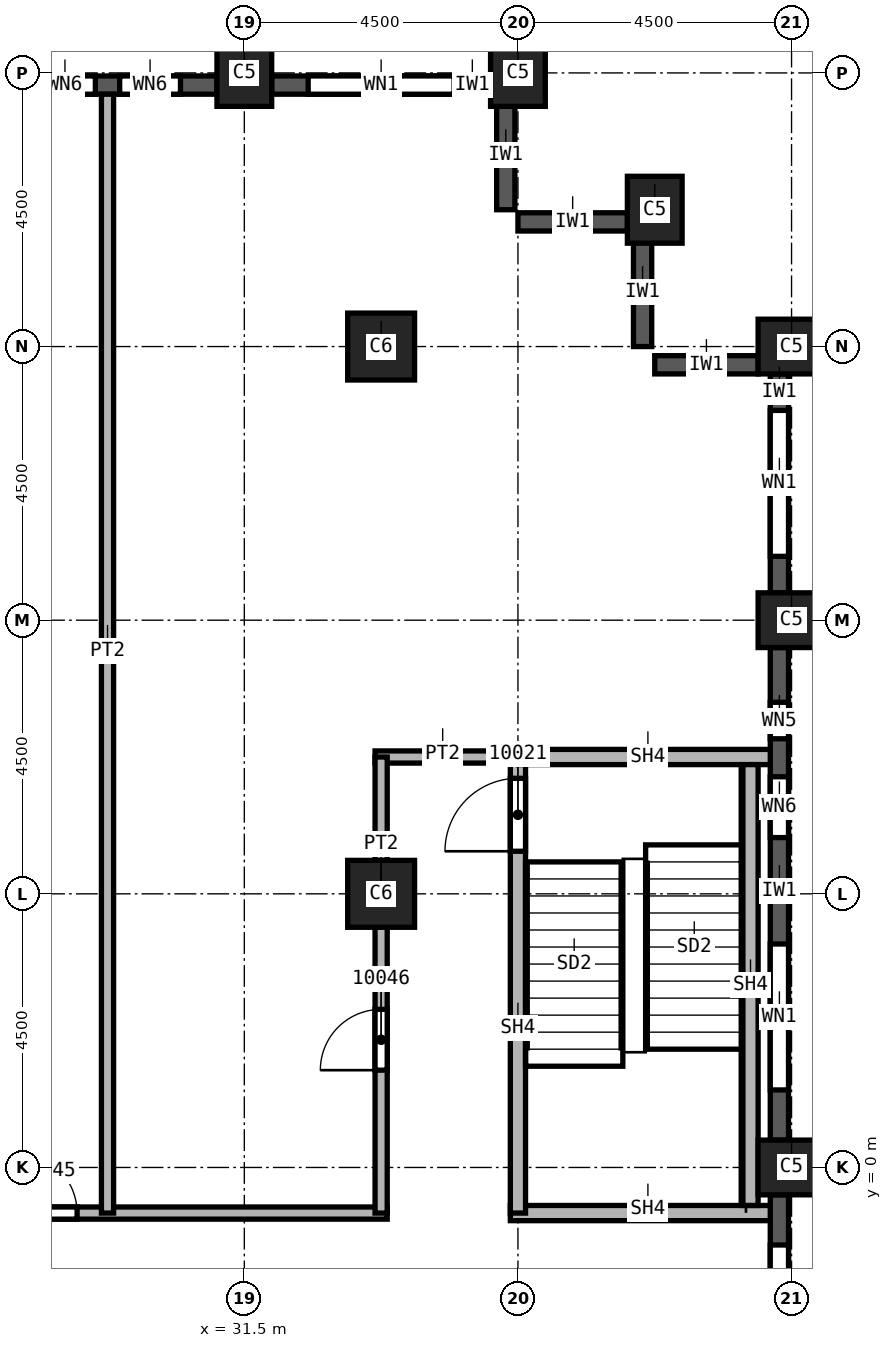
"""IFC4 building model, lengths in metres.
Left out: names, types, materials, properties, quantities, classifications, styles, units other than length and angle.
Written with IfcOpenShell. Run it as: python <this file> out.ifc"""

import sys

from ifc_helpers import new_model, si_unit, direction, frame, frame_2d, origin, origin_2d, place, context, subcontext, project, spatial, rectangle, extrude, element, fill, save


model = new_model("IFC4")
c1 = context("Model", 3, precision=1e-05, world=origin(), true_north=direction((0.0, 1.0)))
c2 = subcontext(c1, "Body", "Model", "MODEL_VIEW")
j1 = project(units=[si_unit("LENGTHUNIT", "METRE"), si_unit("PLANEANGLEUNIT", "RADIAN")], contexts=[c1])
p1 = place(None, origin())
s1 = spatial("IfcSite", under=j1, at=p1, CompositionType="ELEMENT")
p2 = place(p1, origin())
s2 = spatial("IfcBuilding", under=s1, at=p2, CompositionType="ELEMENT")
p3 = place(p2, frame((0.0, 0.0, 170.0)))
s3 = spatial("IfcBuildingStorey", under=s2, at=p3, CompositionType="ELEMENT", Elevation=170.0)
for number, where, z_axis, x_axis in (
    (1, (40.5, 0.0, 0.0), (0.0, 0.0, 1.0), (0.0, 1.0, 0.0)),
    (2, (40.5, 9.0, 0.0), (0.0, 0.0, 1.0), (0.0, 1.0, 0.0)),
    (3, (40.5, 13.5, 0.0), (0.0, 0.0, 1.0), (0.0, 1.0, 0.0)),
    (4, (38.25, 15.75, 0.0), (0.0, 0.0, 1.0), (1.0, 0.0, 0.0)),
    (5, (31.5, 18.0, 0.0), (0.0, 0.0, 1.0), (1.0, 0.0, 0.0)),
    (6, (36.0, 18.0, 0.0), (0.0, 0.0, 1.0), (1.0, 0.0, 0.0)),
):
    element("IfcColumn", number, at=place(p3, frame(where, z_axis=z_axis, x_axis=x_axis)), inside=s3, PredefinedType="COLUMN", context=c2, shape_type="SweptSolid", body=[
        extrude(rectangle(XDim=0.9, YDim=1.1, at=origin_2d()), origin(), (0.0, 0.0, 1.0), 3.7),
    ])
for number, where, z_axis, x_axis in (
    (7, (33.75, 4.5, 0.0), (0.0, 0.0, 1.0), (1.0, 0.0, 0.0)),
    (8, (33.75, 13.5, 0.0), (0.0, 0.0, 1.0), (1.0, 0.0, 0.0)),
):
    element("IfcColumn", number, at=place(p3, frame(where, z_axis=z_axis, x_axis=x_axis)), inside=s3, PredefinedType="COLUMN", context=c2, shape_type="SweptSolid", body=[
        extrude(rectangle(XDim=1.1, YDim=1.1, at=origin_2d()), origin(), (0.0, 0.0, 1.0), 3.7),
    ])
p4 = place(p3, frame((39.95, 13.2, 0.0), z_axis=(0.0, 0.0, 1.0), x_axis=(-1.0, 0.0, 0.0)))
e9 = element("IfcWall", 9, at=p4, inside=s3, PredefinedType="SOLIDWALL", context=c2, shape_type="SweptSolid", body=[
    extrude(rectangle(XDim=1.7, YDim=0.3, at=frame_2d((0.85, 0.0))), origin(), (0.0, 0.0, 1.0), 3.1),
])
for number, where, z_axis, x_axis in (
    (10, (38.05, 15.3, 0.0), (0.0, 0.0, 1.0), (0.0, -1.0, 0.0)),
    (11, (37.8, 15.55, 0.0), (0.0, 0.0, 1.0), (-1.0, 0.0, 0.0)),
    (12, (35.8, 17.55, 0.0), (0.0, 0.0, 1.0), (0.0, -1.0, 0.0)),
):
    element("IfcWall", number, at=place(p3, frame(where, z_axis=z_axis, x_axis=x_axis)), inside=s3, PredefinedType="SOLIDWALL", context=c2, shape_type="SweptSolid", body=[
        extrude(rectangle(XDim=1.8, YDim=0.3, at=frame_2d((0.9, 0.0))), origin(), (0.0, 0.0, 1.0), 3.1),
    ])
p5 = place(p3, frame((40.3, -8.55, 0.0), z_axis=(0.0, 0.0, 1.0), x_axis=(0.0, 1.0, 0.0)))
e13 = element("IfcWall", 13, at=p5, inside=s3, PredefinedType="SOLIDWALL", context=c2, shape_type="SweptSolid", body=[
    extrude(rectangle(XDim=8.1, YDim=0.3, at=frame_2d((4.05, 0.0))), origin(), (0.0, 0.0, 1.0), 3.1),
])
p6 = place(p5, frame((0.825, 0.0, 0.8)))
e14 = element("IfcOpeningElement", 14, at=p6, cuts=e13, PredefinedType="OPENING", context=c2, shape_type="SweptSolid", body=[
    extrude(rectangle(XDim=2.4, YDim=1.95, at=frame_2d((1.2, 0.975))), frame((0.0, 0.15, 0.0), z_axis=(0.0, -1.0, 0.0), x_axis=(1.0, 0.0, 0.0)), (0.0, 0.0, 1.0), 0.3),
])
p7 = place(p5, frame((4.875, 0.0, 0.8)))
e15 = element("IfcOpeningElement", 15, at=p7, cuts=e13, PredefinedType="OPENING", context=c2, shape_type="SweptSolid", body=[
    extrude(rectangle(XDim=2.4, YDim=1.95, at=frame_2d((1.2, 0.975))), frame((0.0, 0.15, 0.0), z_axis=(0.0, -1.0, 0.0), x_axis=(1.0, 0.0, 0.0)), (0.0, 0.0, 1.0), 0.3),
])
p8 = place(p3, frame((40.3, 0.45, 0.0), z_axis=(0.0, 0.0, 1.0), x_axis=(0.0, 1.0, 0.0)))
e16 = element("IfcWall", 16, at=p8, inside=s3, PredefinedType="SOLIDWALL", context=c2, shape_type="SweptSolid", body=[
    extrude(rectangle(XDim=8.1, YDim=0.3, at=frame_2d((4.05, 0.0))), origin(), (0.0, 0.0, 1.0), 3.1),
])
p9 = place(p8, frame((0.825, 0.0, 0.8)))
e17 = element("IfcOpeningElement", 17, at=p9, cuts=e16, PredefinedType="OPENING", context=c2, shape_type="SweptSolid", body=[
    extrude(rectangle(XDim=2.4, YDim=1.95, at=frame_2d((1.2, 0.975))), frame((0.0, 0.15, 0.0), z_axis=(0.0, -1.0, 0.0), x_axis=(1.0, 0.0, 0.0)), (0.0, 0.0, 1.0), 0.3),
])
p10 = place(p8, frame((4.975, 0.0, 0.8)))
e18 = element("IfcOpeningElement", 18, at=p10, cuts=e16, PredefinedType="OPENING", context=c2, shape_type="SweptSolid", body=[
    extrude(rectangle(XDim=1.0, YDim=1.95, at=frame_2d((0.5, 0.975))), frame((0.0, 0.15, 0.0), z_axis=(0.0, -1.0, 0.0), x_axis=(1.0, 0.0, 0.0)), (0.0, 0.0, 1.0), 0.3),
])
p11 = place(p8, frame((6.6, 0.0, 0.8)))
e19 = element("IfcOpeningElement", 19, at=p11, cuts=e16, PredefinedType="OPENING", context=c2, shape_type="SweptSolid", body=[
    extrude(rectangle(XDim=0.6, YDim=1.95, at=frame_2d((0.3, 0.975))), frame((0.0, 0.15, 0.0), z_axis=(0.0, -1.0, 0.0), x_axis=(1.0, 0.0, 0.0)), (0.0, 0.0, 1.0), 0.3),
])
p12 = place(p3, frame((40.3, 9.45, 0.0), z_axis=(0.0, 0.0, 1.0), x_axis=(0.0, 1.0, 0.0)))
e20 = element("IfcWall", 20, at=p12, inside=s3, PredefinedType="SOLIDWALL", context=c2, shape_type="SweptSolid", body=[
    extrude(rectangle(XDim=3.6, YDim=0.3, at=frame_2d((1.8, 0.0))), origin(), (0.0, 0.0, 1.0), 3.1),
])
p13 = place(p12, frame((0.6, 0.0, 0.8)))
e21 = element("IfcOpeningElement", 21, at=p13, cuts=e20, PredefinedType="OPENING", context=c2, shape_type="SweptSolid", body=[
    extrude(rectangle(XDim=2.4, YDim=1.95, at=frame_2d((1.2, 0.975))), frame((0.0, 0.15, 0.0), z_axis=(0.0, -1.0, 0.0), x_axis=(1.0, 0.0, 0.0)), (0.0, 0.0, 1.0), 0.3),
])
p14 = place(p3, frame((35.55, 17.8, 0.0), z_axis=(0.0, 0.0, 1.0), x_axis=(-1.0, 0.0, 0.0)))
e22 = element("IfcWall", 22, at=p14, inside=s3, PredefinedType="SOLIDWALL", context=c2, shape_type="SweptSolid", body=[
    extrude(rectangle(XDim=3.6, YDim=0.3, at=frame_2d((1.8, 0.0))), origin(), (0.0, 0.0, 1.0), 3.1),
])
p15 = place(p14, frame((0.6, 0.0, 0.8)))
e23 = element("IfcOpeningElement", 23, at=p15, cuts=e22, PredefinedType="OPENING", context=c2, shape_type="SweptSolid", body=[
    extrude(rectangle(XDim=2.4, YDim=1.95, at=frame_2d((1.2, 0.975))), frame((0.0, 0.15, 0.0), z_axis=(0.0, -1.0, 0.0), x_axis=(1.0, 0.0, 0.0)), (0.0, 0.0, 1.0), 0.3),
])
p16 = place(p3, frame((31.05, 17.8, 0.0), z_axis=(0.0, 0.0, 1.0), x_axis=(-1.0, 0.0, 0.0)))
e24 = element("IfcWall", 24, at=p16, inside=s3, PredefinedType="SOLIDWALL", context=c2, shape_type="SweptSolid", body=[
    extrude(rectangle(XDim=3.6, YDim=0.3, at=frame_2d((1.8, 0.0))), origin(), (0.0, 0.0, 1.0), 3.1),
])
p17 = place(p16, frame((0.6, 0.0, 0.8)))
e25 = element("IfcOpeningElement", 25, at=p17, cuts=e24, PredefinedType="OPENING", context=c2, shape_type="SweptSolid", body=[
    extrude(rectangle(XDim=1.0, YDim=1.95, at=frame_2d((0.5, 0.975))), frame((0.0, 0.15, 0.0), z_axis=(0.0, -1.0, 0.0), x_axis=(1.0, 0.0, 0.0)), (0.0, 0.0, 1.0), 0.3),
])
p18 = place(p16, frame((2.0, 0.0, 0.8)))
e26 = element("IfcOpeningElement", 26, at=p18, cuts=e24, PredefinedType="OPENING", context=c2, shape_type="SweptSolid", body=[
    extrude(rectangle(XDim=1.0, YDim=1.95, at=frame_2d((0.5, 0.975))), frame((0.0, 0.15, 0.0), z_axis=(0.0, -1.0, 0.0), x_axis=(1.0, 0.0, 0.0)), (0.0, 0.0, 1.0), 0.3),
])
p19 = place(p3, frame((15.4, -0.75, 0.0), z_axis=(0.0, 0.0, 1.0), x_axis=(1.0, 0.0, 0.0)))
e27 = element("IfcWall", 27, at=p19, inside=s3, PredefinedType="PARTITIONING", context=c2, shape_type="SweptSolid", body=[
    extrude(rectangle(XDim=18.45, YDim=0.2, at=frame_2d((9.225, 0.0))), origin(), (0.0, 0.0, 1.0), 3.7),
])
p20 = place(p19, frame((2.65, 0.0, 0.0)))
e28 = element("IfcOpeningElement", 28, at=p20, cuts=e27, PredefinedType="OPENING", context=c2, shape_type="SweptSolid", body=[
    extrude(rectangle(XDim=1.0, YDim=2.1, at=frame_2d((0.5, 1.05))), frame((0.0, 0.1, 0.0), z_axis=(0.0, -1.0, 0.0), x_axis=(1.0, 0.0, 0.0)), (0.0, 0.0, 1.0), 0.2),
])
p21 = place(p19, frame((12.35, 0.0, 0.0)))
e29 = element("IfcOpeningElement", 29, at=p21, cuts=e27, PredefinedType="OPENING", context=c2, shape_type="SweptSolid", body=[
    extrude(rectangle(XDim=1.0, YDim=2.1, at=frame_2d((0.5, 1.05))), frame((0.0, 0.1, 0.0), z_axis=(0.0, -1.0, 0.0), x_axis=(1.0, 0.0, 0.0)), (0.0, 0.0, 1.0), 0.2),
])
p22 = place(p3, frame((29.25, 17.65, 0.0), z_axis=(0.0, 0.0, 1.0), x_axis=(0.0, -1.0, 0.0)))
e30 = element("IfcWall", 30, at=p22, inside=s3, PredefinedType="PARTITIONING", context=c2, shape_type="SweptSolid", body=[
    extrude(rectangle(XDim=18.4, YDim=0.2, at=frame_2d((9.2, 0.0))), origin(), (0.0, 0.0, 1.0), 3.7),
])
p23 = place(p3, frame((33.65, 6.75, 0.0), z_axis=(0.0, 0.0, 1.0), x_axis=(1.0, 0.0, 0.0)))
e31 = element("IfcWall", 31, at=p23, inside=s3, PredefinedType="PARTITIONING", context=c2, shape_type="SweptSolid", body=[
    extrude(rectangle(XDim=2.35, YDim=0.2, at=frame_2d((1.175, 0.0))), origin(), (0.0, 0.0, 1.0), 3.7),
])
p24 = place(p3, frame((33.75, -0.75, 0.0), z_axis=(0.0, 0.0, 1.0), x_axis=(0.0, 1.0, 0.0)))
e32 = element("IfcWall", 32, at=p24, inside=s3, PredefinedType="PARTITIONING", context=c2, shape_type="SweptSolid", body=[
    extrude(rectangle(XDim=7.5, YDim=0.2, at=frame_2d((3.75, 0.0))), origin(), (0.0, 0.0, 1.0), 3.7),
])
p25 = place(p24, frame((2.35, 0.0, 0.0)))
e33 = element("IfcOpeningElement", 33, at=p25, cuts=e32, PredefinedType="OPENING", context=c2, shape_type="SweptSolid", body=[
    extrude(rectangle(XDim=1.0, YDim=2.1, at=frame_2d((0.5, 1.05))), frame((0.0, 0.1, 0.0), z_axis=(0.0, -1.0, 0.0), x_axis=(1.0, 0.0, 0.0)), (0.0, 0.0, 1.0), 0.2),
])
p26 = place(p3, frame((35.875, -0.75, 0.0), z_axis=(0.0, 0.0, 1.0), x_axis=(1.0, 0.0, 0.0)))
e34 = element("IfcWall", 34, at=p26, inside=s3, PredefinedType="SOLIDWALL", context=c2, shape_type="SweptSolid", body=[
    extrude(rectangle(XDim=4.275, YDim=0.25, at=frame_2d((2.137, 0.0))), origin(), (0.0, 0.0, 1.0), 3.7),
])
p27 = place(p3, frame((36.0, -0.75, 0.0), z_axis=(0.0, 0.0, 1.0), x_axis=(0.0, 1.0, 0.0)))
e35 = element("IfcWall", 35, at=p27, inside=s3, PredefinedType="SOLIDWALL", context=c2, shape_type="SweptSolid", body=[
    extrude(rectangle(XDim=7.625, YDim=0.25, at=frame_2d((3.812, 0.0))), origin(), (0.0, 0.0, 1.0), 3.7),
])
p28 = place(p27, frame((5.95, 0.0, 0.0)))
e36 = element("IfcOpeningElement", 36, at=p28, cuts=e35, PredefinedType="OPENING", context=c2, shape_type="SweptSolid", body=[
    extrude(rectangle(XDim=1.2, YDim=2.1, at=frame_2d((0.6, 1.05))), frame((0.0, 0.125, 0.0), z_axis=(0.0, -1.0, 0.0), x_axis=(1.0, 0.0, 0.0)), (0.0, 0.0, 1.0), 0.25),
])
p29 = place(p3, frame((36.0, 6.75, 0.0), z_axis=(0.0, 0.0, 1.0), x_axis=(1.0, 0.0, 0.0)))
e37 = element("IfcWall", 37, at=p29, inside=s3, PredefinedType="SOLIDWALL", context=c2, shape_type="SweptSolid", body=[
    extrude(rectangle(XDim=4.15, YDim=0.25, at=frame_2d((2.075, 0.0))), origin(), (0.0, 0.0, 1.0), 3.7),
])
p30 = place(p3, frame((39.825, -0.625, 0.0), z_axis=(0.0, 0.0, 1.0), x_axis=(0.0, 1.0, 0.0)))
e38 = element("IfcWall", 38, at=p30, inside=s3, PredefinedType="SOLIDWALL", context=c2, shape_type="SweptSolid", body=[
    extrude(rectangle(XDim=7.25, YDim=0.25, at=frame_2d((3.625, 0.0))), origin(), (0.0, 0.0, 1.0), 3.7),
])
p31 = place(p7, origin())
e39 = element("IfcWindow", 39, at=p31, inside=s3, PartitioningType="SINGLE_PANEL", PredefinedType="WINDOW", context=c2, shape_type="SweptSolid", body=[
    extrude(rectangle(XDim=2.4, YDim=1.95, at=frame_2d((1.2, 0.975))), frame((0.0, 0.03, 0.0), z_axis=(0.0, -1.0, 0.0), x_axis=(1.0, 0.0, 0.0)), (0.0, 0.0, 1.0), 0.06),
])
fill(e15, e39)
p32 = place(p9, origin())
e40 = element("IfcWindow", 40, at=p32, inside=s3, PartitioningType="SINGLE_PANEL", PredefinedType="WINDOW", context=c2, shape_type="SweptSolid", body=[
    extrude(rectangle(XDim=2.4, YDim=1.95, at=frame_2d((1.2, 0.975))), frame((0.0, 0.03, 0.0), z_axis=(0.0, -1.0, 0.0), x_axis=(1.0, 0.0, 0.0)), (0.0, 0.0, 1.0), 0.06),
])
fill(e17, e40)
p33 = place(p13, origin())
e41 = element("IfcWindow", 41, at=p33, inside=s3, PartitioningType="SINGLE_PANEL", PredefinedType="WINDOW", context=c2, shape_type="SweptSolid", body=[
    extrude(rectangle(XDim=2.4, YDim=1.95, at=frame_2d((1.2, 0.975))), frame((0.0, 0.03, 0.0), z_axis=(0.0, -1.0, 0.0), x_axis=(1.0, 0.0, 0.0)), (0.0, 0.0, 1.0), 0.06),
])
fill(e21, e41)
p34 = place(p15, origin())
e42 = element("IfcWindow", 42, at=p34, inside=s3, PartitioningType="SINGLE_PANEL", PredefinedType="WINDOW", context=c2, shape_type="SweptSolid", body=[
    extrude(rectangle(XDim=2.4, YDim=1.95, at=frame_2d((1.2, 0.975))), frame((0.0, 0.03, 0.0), z_axis=(0.0, -1.0, 0.0), x_axis=(1.0, 0.0, 0.0)), (0.0, 0.0, 1.0), 0.06),
])
fill(e23, e42)
p35 = place(p28, origin())
e43 = element("IfcDoor", 43, at=p35, inside=s3, OperationType="SINGLE_SWING_RIGHT", PredefinedType="DOOR", context=c2, shape_type="SweptSolid", body=[
    extrude(rectangle(XDim=1.2, YDim=2.1, at=frame_2d((0.6, 1.05))), frame((0.0, 0.025, 0.0), z_axis=(0.0, -1.0, 0.0), x_axis=(1.0, 0.0, 0.0)), (0.0, 0.0, 1.0), 0.05),
])
fill(e36, e43)
p36 = place(p21, origin())
e44 = element("IfcDoor", 44, at=p36, inside=s3, OperationType="SINGLE_SWING_RIGHT", PredefinedType="DOOR", context=c2, shape_type="SweptSolid", body=[
    extrude(rectangle(XDim=1.0, YDim=2.1, at=frame_2d((0.5, 1.05))), frame((0.0, 0.025, 0.0), z_axis=(0.0, -1.0, 0.0), x_axis=(1.0, 0.0, 0.0)), (0.0, 0.0, 1.0), 0.05),
])
fill(e29, e44)
p37 = place(p25, origin())
e45 = element("IfcDoor", 45, at=p37, inside=s3, OperationType="SINGLE_SWING_LEFT", PredefinedType="DOOR", context=c2, shape_type="SweptSolid", body=[
    extrude(rectangle(XDim=1.0, YDim=2.1, at=frame_2d((0.5, 1.05))), frame((0.0, 0.025, 0.0), z_axis=(0.0, -1.0, 0.0), x_axis=(1.0, 0.0, 0.0)), (0.0, 0.0, 1.0), 0.05),
])
fill(e33, e45)
p38 = place(p10, origin())
e46 = element("IfcWindow", 46, at=p38, inside=s3, PartitioningType="SINGLE_PANEL", PredefinedType="WINDOW", context=c2, shape_type="SweptSolid", body=[
    extrude(rectangle(XDim=1.0, YDim=1.95, at=frame_2d((0.5, 0.975))), frame((0.0, 0.03, 0.0), z_axis=(0.0, -1.0, 0.0), x_axis=(1.0, 0.0, 0.0)), (0.0, 0.0, 1.0), 0.06),
])
fill(e18, e46)
p39 = place(p11, origin())
e47 = element("IfcWindow", 47, at=p39, inside=s3, PartitioningType="SINGLE_PANEL", PredefinedType="WINDOW", context=c2, shape_type="SweptSolid", body=[
    extrude(rectangle(XDim=0.6, YDim=1.95, at=frame_2d((0.3, 0.975))), frame((0.0, 0.03, 0.0), z_axis=(0.0, -1.0, 0.0), x_axis=(1.0, 0.0, 0.0)), (0.0, 0.0, 1.0), 0.06),
])
fill(e19, e47)
p40 = place(p17, origin())
e48 = element("IfcWindow", 48, at=p40, inside=s3, PartitioningType="SINGLE_PANEL", PredefinedType="WINDOW", context=c2, shape_type="SweptSolid", body=[
    extrude(rectangle(XDim=1.0, YDim=1.95, at=frame_2d((0.5, 0.975))), frame((0.0, 0.03, 0.0), z_axis=(0.0, -1.0, 0.0), x_axis=(1.0, 0.0, 0.0)), (0.0, 0.0, 1.0), 0.06),
])
fill(e25, e48)
p41 = place(p18, origin())
e49 = element("IfcWindow", 49, at=p41, inside=s3, PartitioningType="SINGLE_PANEL", PredefinedType="WINDOW", context=c2, shape_type="SweptSolid", body=[
    extrude(rectangle(XDim=1.0, YDim=1.95, at=frame_2d((0.5, 0.975))), frame((0.0, 0.03, 0.0), z_axis=(0.0, -1.0, 0.0), x_axis=(1.0, 0.0, 0.0)), (0.0, 0.0, 1.0), 0.06),
])
fill(e26, e49)
save(model, sys.argv[1])
